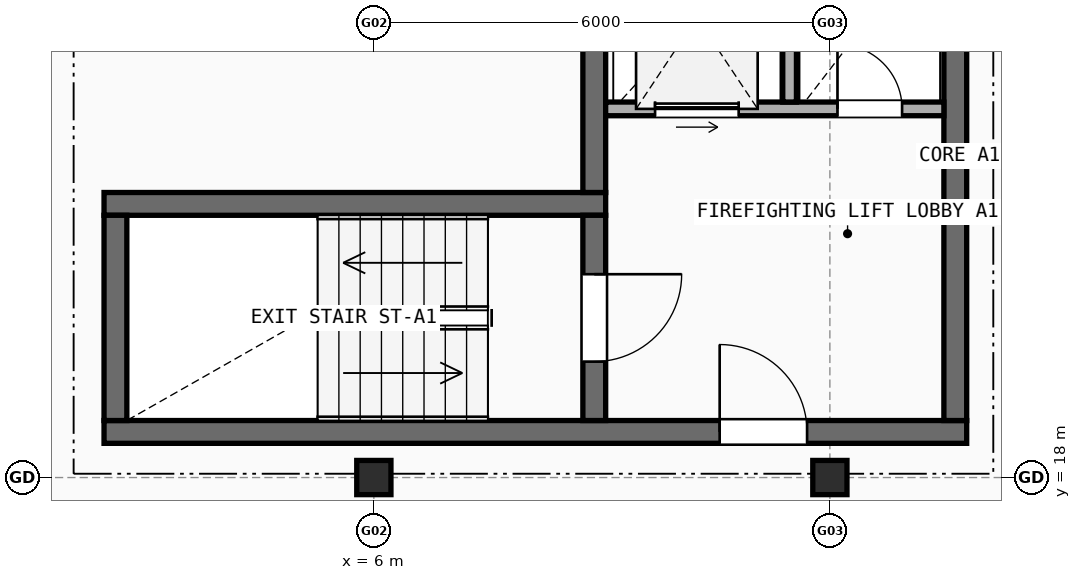
"""IFC4 building model, lengths in metres.
Left out: names, types, materials, properties, quantities, classifications, styles, units other than length and angle.
Written with IfcOpenShell. Run it as: python <this file> out.ifc"""

import sys

from ifc_helpers import new_model, si_unit, direction, frame, frame_2d, origin, origin_2d, place, context, subcontext, project, spatial, rectangle, extrude, element, fill, save


model = new_model("IFC4")
c1 = context("Model", 3, precision=1e-05, world=origin(), true_north=direction((0.0, 1.0)))
c2 = subcontext(c1, "Body", "Model", "MODEL_VIEW")
j1 = project(units=[si_unit("LENGTHUNIT", "METRE"), si_unit("PLANEANGLEUNIT", "RADIAN")], contexts=[c1])
p1 = place(None, origin())
s1 = spatial("IfcSite", under=j1, at=p1, CompositionType="ELEMENT")
p2 = place(p1, origin())
s2 = spatial("IfcBuilding", under=s1, at=p2, CompositionType="ELEMENT")
p3 = place(p2, frame((0.0, 0.0, 36.5)))
s3 = spatial("IfcBuildingStorey", under=s2, at=p3, CompositionType="ELEMENT", Elevation=36.5)
for number, where, z_axis, x_axis in (
    (1, (6.0, 18.0, 0.0), (0.0, 0.0, 1.0), (1.0, 0.0, 0.0)),
    (2, (12.0, 18.0, 0.0), (0.0, 0.0, 1.0), (1.0, 0.0, 0.0)),
):
    element("IfcColumn", number, at=place(p3, frame(where, z_axis=z_axis, x_axis=x_axis)), inside=s3, PredefinedType="COLUMN", context=c2, shape_type="SweptSolid", body=[
        extrude(rectangle(XDim=0.45, YDim=0.45, at=origin_2d()), origin(), (0.0, 0.0, 1.0), 2.995),
    ])
p4 = place(p3, frame((2.45, 18.6, 0.0), z_axis=(0.0, 0.0, 1.0), x_axis=(1.0, 0.0, 0.0)))
e3 = element("IfcWall", 3, at=p4, inside=s3, PredefinedType="SHEAR", context=c2, shape_type="SweptSolid", body=[
    extrude(rectangle(XDim=11.35, YDim=0.3, at=frame_2d((5.675, 0.0))), origin(), (0.0, 0.0, 1.0), 2.995),
])
p5 = place(p4, frame((8.1, 0.0, 0.0)))
e4 = element("IfcOpeningElement", 4, at=p5, cuts=e3, PredefinedType="OPENING", context=c2, shape_type="SweptSolid", body=[
    extrude(rectangle(XDim=1.15, YDim=2.15, at=frame_2d((0.575, 1.075))), frame((0.0, 0.16, 0.0), z_axis=(0.0, -1.0, 0.0), x_axis=(1.0, 0.0, 0.0)), (0.0, 0.0, 1.0), 0.32),
])
p6 = place(p3, frame((9.05, 21.6, 0.0), z_axis=(0.0, 0.0, 1.0), x_axis=(-1.0, 0.0, 0.0)))
e5 = element("IfcWall", 5, at=p6, inside=s3, PredefinedType="SHEAR", context=c2, shape_type="SweptSolid", body=[
    extrude(rectangle(XDim=6.6, YDim=0.3, at=frame_2d((3.3, 0.0))), origin(), (0.0, 0.0, 1.0), 2.995),
])
p7 = place(p3, frame((2.6, 21.45, 0.0), z_axis=(0.0, 0.0, 1.0), x_axis=(0.0, -1.0, 0.0)))
e6 = element("IfcWall", 6, at=p7, inside=s3, PredefinedType="SHEAR", context=c2, shape_type="SweptSolid", body=[
    extrude(rectangle(XDim=2.7, YDim=0.3, at=frame_2d((1.35, 0.0))), origin(), (0.0, 0.0, 1.0), 2.995),
])
p8 = place(p3, frame((8.9, 18.75, 0.0), z_axis=(0.0, 0.0, 1.0), x_axis=(0.0, 1.0, 0.0)))
e7 = element("IfcWall", 7, at=p8, inside=s3, PredefinedType="SHEAR", context=c2, shape_type="SweptSolid", body=[
    extrude(rectangle(XDim=2.7, YDim=0.3, at=frame_2d((1.35, 0.0))), origin(), (0.0, 0.0, 1.0), 2.995),
])
p9 = place(p8, frame((0.775, 0.0, 0.0)))
e8 = element("IfcOpeningElement", 8, at=p9, cuts=e7, PredefinedType="OPENING", context=c2, shape_type="SweptSolid", body=[
    extrude(rectangle(XDim=1.15, YDim=2.15, at=frame_2d((0.575, 1.075))), frame((0.0, 0.16, 0.0), z_axis=(0.0, -1.0, 0.0), x_axis=(1.0, 0.0, 0.0)), (0.0, 0.0, 1.0), 0.32),
])
p10 = place(p3, frame((13.65, 18.75, 0.0), z_axis=(0.0, 0.0, 1.0), x_axis=(0.0, 1.0, 0.0)))
e9 = element("IfcWall", 9, at=p10, inside=s3, PredefinedType="SHEAR", context=c2, shape_type="SweptSolid", body=[
    extrude(rectangle(XDim=6.45, YDim=0.3, at=frame_2d((3.225, 0.0))), origin(), (0.0, 0.0, 1.0), 2.995),
])
p11 = place(p3, frame((8.9, 21.75, 0.0), z_axis=(0.0, 0.0, 1.0), x_axis=(0.0, 1.0, 0.0)))
e10 = element("IfcWall", 10, at=p11, inside=s3, PredefinedType="SHEAR", context=c2, shape_type="SweptSolid", body=[
    extrude(rectangle(XDim=3.45, YDim=0.3, at=frame_2d((1.725, 0.0))), origin(), (0.0, 0.0, 1.0), 2.995),
])
p12 = place(p3, frame((9.05, 22.85, 0.0), z_axis=(0.0, 0.0, 1.0), x_axis=(1.0, 0.0, 0.0)))
e11 = element("IfcWall", 11, at=p12, inside=s3, PredefinedType="SOLIDWALL", context=c2, shape_type="SweptSolid", body=[
    extrude(rectangle(XDim=4.45, YDim=0.18, at=frame_2d((2.225, 0.0))), origin(), (0.0, 0.0, 1.0), 2.995),
])
p13 = place(p12, frame((0.65, 0.0, 0.0)))
e12 = element("IfcOpeningElement", 12, at=p13, cuts=e11, PredefinedType="OPENING", context=c2, shape_type="SweptSolid", body=[
    extrude(rectangle(XDim=1.1, YDim=2.15, at=frame_2d((0.55, 1.075))), frame((0.0, 0.1, 0.0), z_axis=(0.0, -1.0, 0.0), x_axis=(1.0, 0.0, 0.0)), (0.0, 0.0, 1.0), 0.2),
])
p14 = place(p12, frame((3.05, 0.0, 0.0)))
e13 = element("IfcOpeningElement", 13, at=p14, cuts=e11, PredefinedType="OPENING", context=c2, shape_type="SweptSolid", body=[
    extrude(rectangle(XDim=0.85, YDim=2.1, at=frame_2d((0.425, 1.05))), frame((0.0, 0.1, 0.0), z_axis=(0.0, -1.0, 0.0), x_axis=(1.0, 0.0, 0.0)), (0.0, 0.0, 1.0), 0.2),
])
p15 = place(p3, frame((11.47, 22.94, 0.0), z_axis=(0.0, 0.0, 1.0), x_axis=(0.0, 1.0, 0.0)))
e14 = element("IfcWall", 14, at=p15, inside=s3, PredefinedType="SOLIDWALL", context=c2, shape_type="SweptSolid", body=[
    extrude(rectangle(XDim=2.26, YDim=0.18, at=frame_2d((1.13, 0.0))), origin(), (0.0, 0.0, 1.0), 2.995),
])
p16 = place(p5, origin())
e15 = element("IfcDoor", 15, at=p16, inside=s3, OperationType="SINGLE_SWING_LEFT", PredefinedType="DOOR", context=c2, shape_type="SweptSolid", body=[
    extrude(rectangle(XDim=1.15, YDim=2.15, at=frame_2d((0.575, 1.075))), frame((0.0, 0.025, 0.0), z_axis=(0.0, -1.0, 0.0), x_axis=(1.0, 0.0, 0.0)), (0.0, 0.0, 1.0), 0.05),
])
fill(e4, e15)
p17 = place(p9, origin())
e16 = element("IfcDoor", 16, at=p17, inside=s3, OperationType="SINGLE_SWING_RIGHT", PredefinedType="DOOR", context=c2, shape_type="SweptSolid", body=[
    extrude(rectangle(XDim=1.15, YDim=2.15, at=frame_2d((0.575, 1.075))), frame((0.0, 0.025, 0.0), z_axis=(0.0, -1.0, 0.0), x_axis=(1.0, 0.0, 0.0)), (0.0, 0.0, 1.0), 0.05),
])
fill(e8, e16)
p18 = place(p13, origin())
e17 = element("IfcDoor", 17, at=p18, inside=s3, OperationType="SLIDING_TO_LEFT", PredefinedType="DOOR", context=c2, shape_type="SweptSolid", body=[
    extrude(rectangle(XDim=1.1, YDim=2.15, at=frame_2d((0.55, 1.075))), frame((0.0, 0.025, 0.0), z_axis=(0.0, -1.0, 0.0), x_axis=(1.0, 0.0, 0.0)), (0.0, 0.0, 1.0), 0.05),
])
fill(e12, e17)
p19 = place(p14, frame((0.85, 0.0, 0.0), z_axis=(0.0, 0.0, 1.0), x_axis=(-1.0, 0.0, 0.0)))
e18 = element("IfcDoor", 18, at=p19, inside=s3, OperationType="SINGLE_SWING_LEFT", PredefinedType="DOOR", context=c2, shape_type="SweptSolid", body=[
    extrude(rectangle(XDim=0.85, YDim=2.1, at=frame_2d((0.425, 1.05))), frame((0.0, 0.025, 0.0), z_axis=(0.0, -1.0, 0.0), x_axis=(1.0, 0.0, 0.0)), (0.0, 0.0, 1.0), 0.05),
])
fill(e13, e18)
save(model, sys.argv[1])
